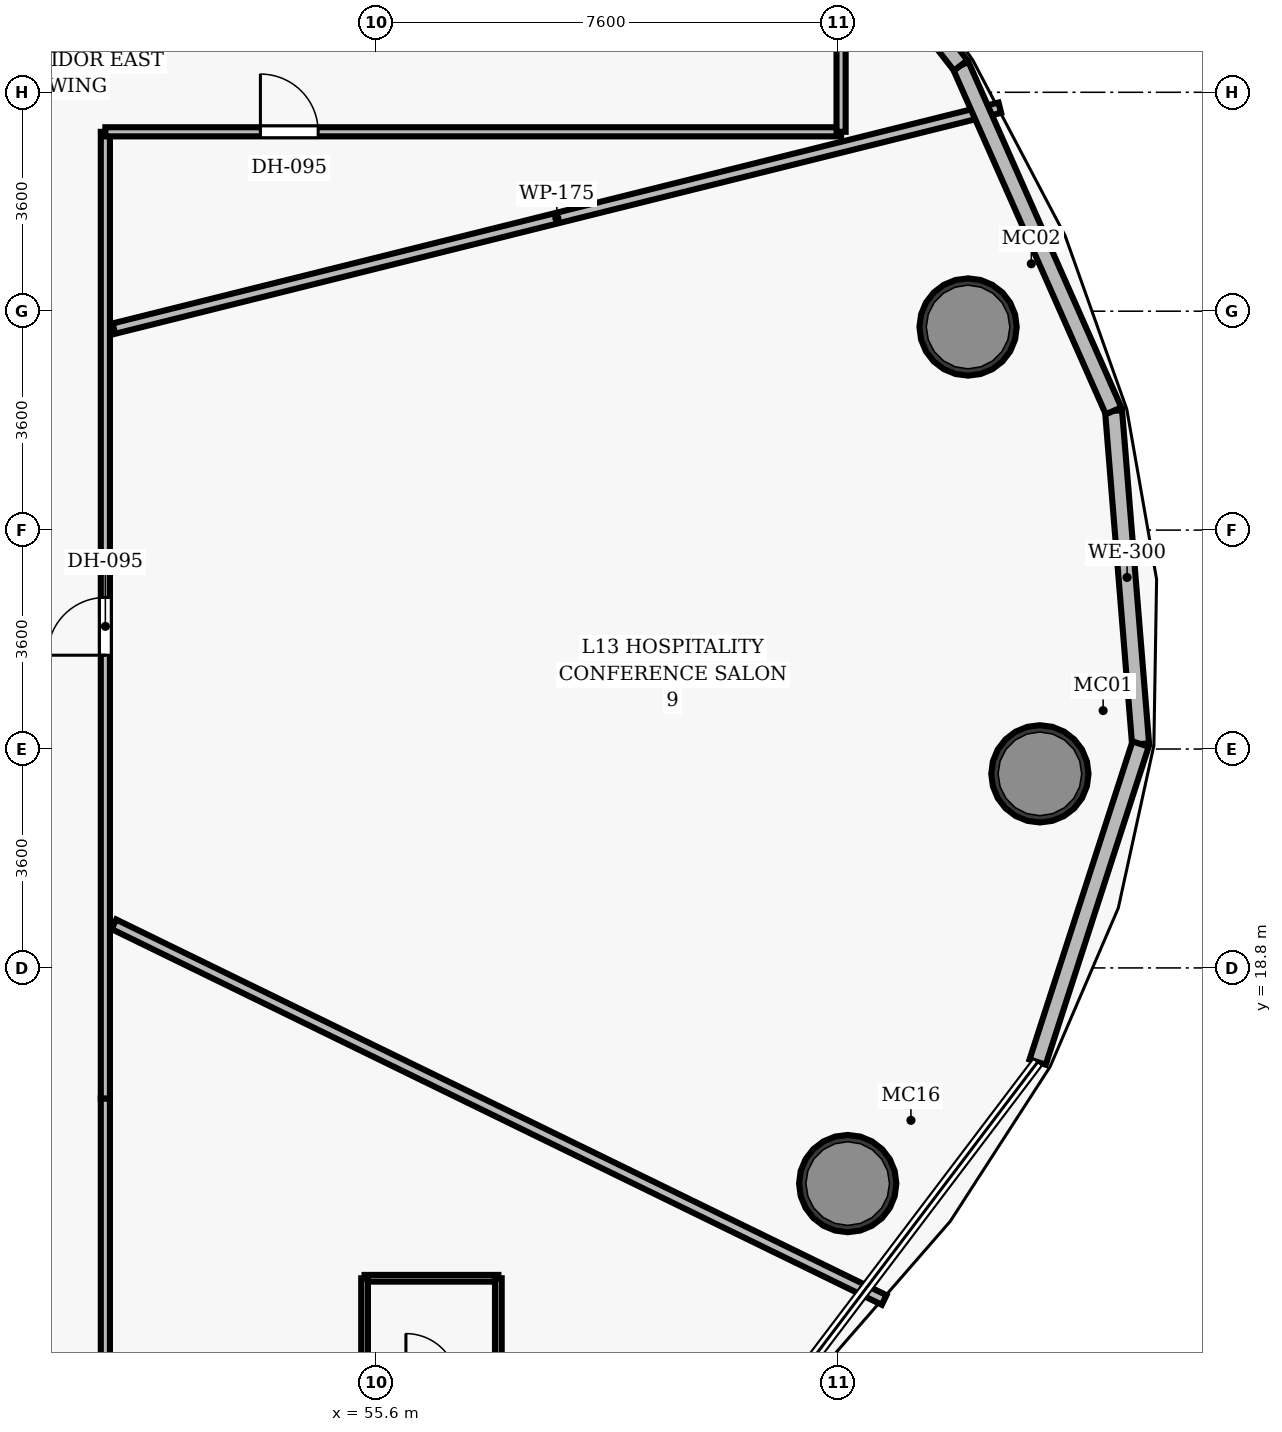
"""IFC4 building model, lengths in metres.
Left out: names, types, materials, properties, quantities, classifications, styles, units other than length and angle.
Written with IfcOpenShell. Run it as: python <this file> out.ifc"""

import sys

from ifc_helpers import new_model, si_unit, direction, frame, frame_2d, origin, origin_2d, place, context, subcontext, project, spatial, rectangle, hollow_circle, extrude, element, fill, save


model = new_model("IFC4")
c1 = context("Model", 3, precision=1e-05, world=origin(), true_north=direction((0.0, 1.0)))
c2 = subcontext(c1, "Body", "Model", "MODEL_VIEW")
j1 = project(units=[si_unit("LENGTHUNIT", "METRE"), si_unit("PLANEANGLEUNIT", "RADIAN")], contexts=[c1])
p1 = place(None, origin())
s1 = spatial("IfcSite", under=j1, at=p1, CompositionType="ELEMENT")
p2 = place(p1, origin())
s2 = spatial("IfcBuilding", under=s1, at=p2, CompositionType="ELEMENT")
p3 = place(p2, frame((0.0, 0.0, 62.4)))
s3 = spatial("IfcBuildingStorey", under=s2, at=p3, CompositionType="ELEMENT", Elevation=62.4)
for number, where, z_axis, x_axis in (
    (1, (66.52, 21.992, 0.0), (0.0, 0.0, 1.0), (1.0, 0.0, 0.0)),
    (2, (65.339, 29.34, 0.0), (0.0, 0.0, 1.0), (1.0, 0.0, 0.0)),
    (3, (63.359, 15.254, 0.0), (0.0, 0.0, 1.0), (1.0, 0.0, 0.0)),
):
    element("IfcColumn", number, at=place(p3, frame(where, z_axis=z_axis, x_axis=x_axis)), inside=s3, PredefinedType="COLUMN", context=c2, shape_type="SweptSolid", body=[
        extrude(hollow_circle(Radius=0.8, WallThickness=0.06, at=origin_2d()), origin(), (0.0, 0.0, 1.0), 3.5),
    ])
p4 = place(p3, frame((51.15, 16.65, 0.0), z_axis=(0.0, 0.0, 1.0), x_axis=(0.0, 1.0, 0.0)))
e4 = element("IfcWall", 4, at=p4, inside=s3, PredefinedType="PARTITIONING", context=c2, shape_type="SweptSolid", body=[
    extrude(rectangle(XDim=15.9, YDim=0.15, at=frame_2d((7.95, 0.0))), origin(), (0.0, 0.0, 1.0), 2.6),
])
p5 = place(p4, frame((7.292, 0.0, 0.0)))
e5 = element("IfcOpeningElement", 5, at=p5, cuts=e4, PredefinedType="OPENING", context=c2, shape_type="SweptSolid", body=[
    extrude(rectangle(XDim=0.95, YDim=2.15, at=frame_2d((0.475, 1.075))), frame((0.0, 0.085, 0.0), z_axis=(0.0, -1.0, 0.0), x_axis=(1.0, 0.0, 0.0)), (0.0, 0.0, 1.0), 0.17),
])
p6 = place(p3, frame((51.15, 32.55, 0.0), z_axis=(0.0, 0.0, 1.0), x_axis=(1.0, 0.0, 0.0)))
e6 = element("IfcWall", 6, at=p6, inside=s3, PredefinedType="PARTITIONING", context=c2, shape_type="SweptSolid", body=[
    extrude(rectangle(XDim=12.1, YDim=0.15, at=frame_2d((6.05, 0.0))), origin(), (0.0, 0.0, 1.0), 2.6),
])
p7 = place(p6, frame((2.55, 0.0, 0.0)))
e7 = element("IfcOpeningElement", 7, at=p7, cuts=e6, PredefinedType="OPENING", context=c2, shape_type="SweptSolid", body=[
    extrude(rectangle(XDim=0.95, YDim=2.15, at=frame_2d((0.475, 1.075))), frame((0.0, 0.085, 0.0), z_axis=(0.0, -1.0, 0.0), x_axis=(1.0, 0.0, 0.0)), (0.0, 0.0, 1.0), 0.17),
])
p8 = place(p3, frame((63.25, 32.55, 0.0), z_axis=(0.0, 0.0, 1.0), x_axis=(0.0, 1.0, 0.0)))
e8 = element("IfcWall", 8, at=p8, inside=s3, PredefinedType="PARTITIONING", context=c2, shape_type="SweptSolid", body=[
    extrude(rectangle(XDim=2.8, YDim=0.15, at=frame_2d((1.4, 0.0))), origin(), (0.0, 0.0, 1.0), 2.6),
])
p9 = place(p3, frame((51.15, 6.5, 0.0), z_axis=(0.0, 0.0, 1.0), x_axis=(0.0, 1.0, 0.0)))
e9 = element("IfcWall", 9, at=p9, inside=s3, PredefinedType="PARTITIONING", context=c2, shape_type="SweptSolid", body=[
    extrude(rectangle(XDim=10.15, YDim=0.15, at=frame_2d((5.075, 0.0))), origin(), (0.0, 0.0, 1.0), 2.6),
])
p10 = place(p3, frame((51.29, 29.314, 0.0), z_axis=(0.0, 0.0, 1.0), x_axis=(0.970298180797, 0.24191205084, 0.0)))
e10 = element("IfcWall", 10, at=p10, inside=s3, PredefinedType="PARTITIONING", context=c2, shape_type="SweptSolid", body=[
    extrude(rectangle(XDim=15.017, YDim=0.175, at=frame_2d((7.509, 0.0))), origin(), (0.0, 0.0, 1.0), 2.6),
])
p11 = place(p3, frame((51.29, 19.518, 0.0), z_axis=(0.0, 0.0, 1.0), x_axis=(0.898790251932, -0.438378926309, 0.0)))
e11 = element("IfcWall", 11, at=p11, inside=s3, PredefinedType="PARTITIONING", context=c2, shape_type="SweptSolid", body=[
    extrude(rectangle(XDim=14.095, YDim=0.175, at=frame_2d((7.047, 0.0))), origin(), (0.0, 0.0, 1.0), 2.6),
])
p12 = place(p3, frame((55.413, 13.696, 0.0), z_axis=(0.0, 0.0, 1.0), x_axis=(1.0, 0.0, 0.0)))
e12 = element("IfcWall", 12, at=p12, inside=s3, PredefinedType="PARTITIONING", context=c2, shape_type="SweptSolid", body=[
    extrude(rectangle(XDim=2.2, YDim=0.11, at=frame_2d((1.1, 0.0))), origin(), (0.0, 0.0, 1.0), 2.6),
])
for number, where, z_axis, x_axis in (
    (13, (55.413, 11.936, 0.0), (0.0, 0.0, 1.0), (0.0, 1.0, 0.0)),
    (14, (57.613, 11.936, 0.0), (0.0, 0.0, 1.0), (0.0, 1.0, 0.0)),
):
    element("IfcWall", number, at=place(p3, frame(where, z_axis=z_axis, x_axis=x_axis)), inside=s3, PredefinedType="PARTITIONING", context=c2, shape_type="SweptSolid", body=[
        extrude(rectangle(XDim=1.76, YDim=0.11, at=frame_2d((0.88, 0.0))), origin(), (0.0, 0.0, 1.0), 2.6),
    ])
p13 = place(p3, frame((67.731, 27.961, 0.0), z_axis=(0.0, 0.0, 1.0), x_axis=(0.080828985953, -0.996727984472, 0.0)))
e15 = element("IfcWall", 15, at=p13, inside=s3, PredefinedType="SOLIDWALL", context=c2, shape_type="SweptSolid", body=[
    extrude(rectangle(XDim=5.497, YDim=0.28, at=frame_2d((2.749, 0.0))), origin(), (0.0, 0.0, 1.0), 3.25),
])
p14 = place(p3, frame((65.217, 33.642, 0.0), z_axis=(0.0, 0.0, 1.0), x_axis=(0.40466845828, -0.914463470497, 0.0)))
e16 = element("IfcWall", 16, at=p14, inside=s3, PredefinedType="SOLIDWALL", context=c2, shape_type="SweptSolid", body=[
    extrude(rectangle(XDim=6.212, YDim=0.28, at=frame_2d((3.106, 0.0))), origin(), (0.0, 0.0, 1.0), 3.25),
])
p15 = place(p3, frame((60.821, 39.271, 0.0), z_axis=(0.0, 0.0, 1.0), x_axis=(0.615515355717, -0.788124892943, 0.0)))
e17 = element("IfcWall", 17, at=p15, inside=s3, PredefinedType="SOLIDWALL", context=c2, shape_type="SweptSolid", body=[
    extrude(rectangle(XDim=7.143, YDim=0.28, at=frame_2d((3.571, 0.0))), origin(), (0.0, 0.0, 1.0), 3.25),
])
p16 = place(p3, frame((68.176, 22.482, 0.0), z_axis=(0.0, 0.0, 1.0), x_axis=(-0.307982270816, -0.951392096279, 0.0)))
e18 = element("IfcWall", 18, at=p16, inside=s3, PredefinedType="SOLIDWALL", context=c2, shape_type="SweptSolid", body=[
    extrude(rectangle(XDim=5.498, YDim=0.28, at=frame_2d((2.749, 0.0))), origin(), (0.0, 0.0, 1.0), 3.25),
])
p17 = place(p7, origin())
e19 = element("IfcDoor", 19, at=p17, inside=s3, OperationType="SINGLE_SWING_LEFT", PredefinedType="DOOR", context=c2, shape_type="SweptSolid", body=[
    extrude(rectangle(XDim=0.95, YDim=2.15, at=frame_2d((0.475, 1.075))), frame((0.0, 0.025, 0.0), z_axis=(0.0, -1.0, 0.0), x_axis=(1.0, 0.0, 0.0)), (0.0, 0.0, 1.0), 0.05),
])
fill(e7, e19)
p18 = place(p5, origin())
e20 = element("IfcDoor", 20, at=p18, inside=s3, OperationType="SINGLE_SWING_LEFT", PredefinedType="DOOR", context=c2, shape_type="SweptSolid", body=[
    extrude(rectangle(XDim=0.95, YDim=2.15, at=frame_2d((0.475, 1.075))), frame((0.0, 0.025, 0.0), z_axis=(0.0, -1.0, 0.0), x_axis=(1.0, 0.0, 0.0)), (0.0, 0.0, 1.0), 0.05),
])
fill(e5, e20)
save(model, sys.argv[1])
